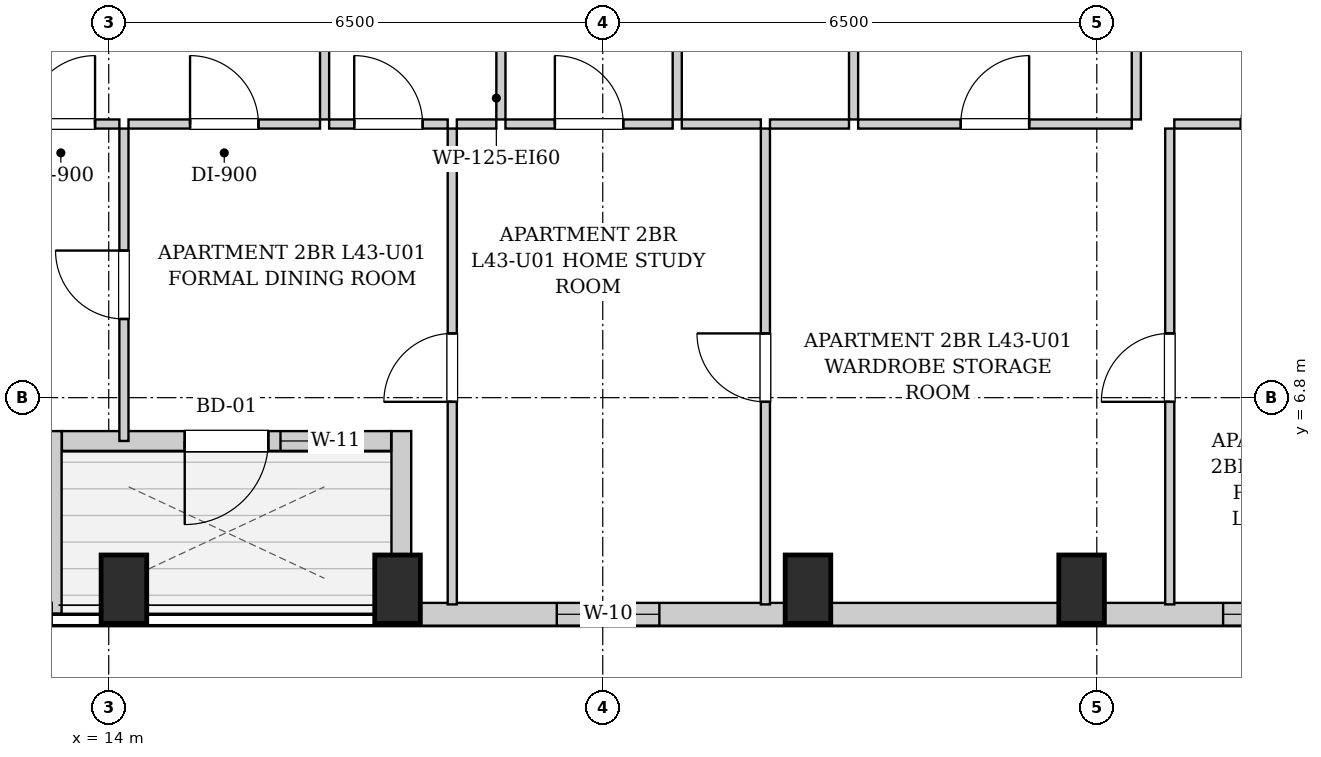
"""IFC4 building model, lengths in metres.
Left out: names, types, materials, properties, quantities, classifications, styles, units other than length and angle.
Written with IfcOpenShell. Run it as: python <this file> out.ifc"""

import sys

from ifc_helpers import new_model, si_unit, direction, frame, frame_2d, origin, origin_2d, place, context, subcontext, project, spatial, rectangle, extrude, element, fill, save


model = new_model("IFC4")
c1 = context("Model", 3, precision=1e-05, world=origin(), true_north=direction((0.0, 1.0)))
c2 = subcontext(c1, "Body", "Model", "MODEL_VIEW")
j1 = project(units=[si_unit("LENGTHUNIT", "METRE"), si_unit("PLANEANGLEUNIT", "RADIAN")], contexts=[c1])
p1 = place(None, origin())
s1 = spatial("IfcSite", under=j1, at=p1, CompositionType="ELEMENT")
p2 = place(p1, origin())
s2 = spatial("IfcBuilding", under=s1, at=p2, CompositionType="ELEMENT")
p3 = place(p2, frame((0.0, 0.0, 150.4)))
s3 = spatial("IfcBuildingStorey", under=s2, at=p3, CompositionType="ELEMENT", Elevation=150.4)
for number, where, z_axis, x_axis in (
    (1, (14.2, 4.28, 0.0), (0.0, 0.0, 1.0), (1.0, 0.0, 0.0)),
    (2, (17.8, 4.28, 0.0), (0.0, 0.0, 1.0), (1.0, 0.0, 0.0)),
    (3, (23.2, 4.28, 0.0), (0.0, 0.0, 1.0), (1.0, 0.0, 0.0)),
    (4, (26.8, 4.28, 0.0), (0.0, 0.0, 1.0), (1.0, 0.0, 0.0)),
):
    element("IfcColumn", number, at=place(p3, frame(where, z_axis=z_axis, x_axis=x_axis)), inside=s3, PredefinedType="COLUMN", context=c2, shape_type="SweptSolid", body=[
        extrude(rectangle(XDim=0.6, YDim=0.9, at=origin_2d()), origin(), (0.0, 0.0, 1.0), 3.25),
    ])
p4 = place(p3, frame((37.8, 3.95, 0.0), z_axis=(0.0, 0.0, 1.0), x_axis=(-1.0, 0.0, 0.0)))
e5 = element("IfcWall", 5, at=p4, inside=s3, PredefinedType="SOLIDWALL", context=c2, shape_type="SweptSolid", body=[
    extrude(rectangle(XDim=19.95, YDim=0.3, at=frame_2d((9.975, 0.0))), origin(), (0.0, 0.0, 1.0), 2.99),
])
p5 = place(p4, frame((16.555, 0.0, 0.55)))
e6 = element("IfcOpeningElement", 6, at=p5, cuts=e5, PredefinedType="OPENING", context=c2, shape_type="SweptSolid", body=[
    extrude(rectangle(XDim=1.35, YDim=1.2, at=frame_2d((0.675, 0.6))), frame((0.0, 0.16, 0.0), z_axis=(0.0, -1.0, 0.0), x_axis=(1.0, 0.0, 0.0)), (0.0, 0.0, 1.0), 0.32),
])
p6 = place(p4, frame((7.788, 0.0, 0.55)))
e7 = element("IfcOpeningElement", 7, at=p6, cuts=e5, PredefinedType="OPENING", context=c2, shape_type="SweptSolid", body=[
    extrude(rectangle(XDim=1.35, YDim=1.2, at=frame_2d((0.675, 0.6))), frame((0.0, 0.16, 0.0), z_axis=(0.0, -1.0, 0.0), x_axis=(1.0, 0.0, 0.0)), (0.0, 0.0, 1.0), 0.32),
])
p7 = place(p4, frame((5.06, 0.0, 0.55)))
e8 = element("IfcOpeningElement", 8, at=p7, cuts=e5, PredefinedType="OPENING", context=c2, shape_type="SweptSolid", body=[
    extrude(rectangle(XDim=1.35, YDim=1.2, at=frame_2d((0.675, 0.6))), frame((0.0, 0.16, 0.0), z_axis=(0.0, -1.0, 0.0), x_axis=(1.0, 0.0, 0.0)), (0.0, 0.0, 1.0), 0.32),
])
p8 = place(p3, frame((17.85, 3.96, 0.0), z_axis=(0.0, 0.0, 1.0), x_axis=(0.0, 1.0, 0.0)))
e9 = element("IfcWall", 9, at=p8, inside=s3, PredefinedType="SOLIDWALL", context=c2, shape_type="SweptSolid", body=[
    extrude(rectangle(XDim=2.4, YDim=0.26, at=frame_2d((1.2, 0.0))), origin(), (0.0, 0.0, 1.0), 2.442),
])
p9 = place(p3, frame((17.716, 6.23, 0.0), z_axis=(0.0, 0.0, 1.0), x_axis=(-1.0, 0.0, 0.0)))
e10 = element("IfcWall", 10, at=p9, inside=s3, PredefinedType="SOLIDWALL", context=c2, shape_type="SweptSolid", body=[
    extrude(rectangle(XDim=4.332, YDim=0.26, at=frame_2d((2.166, 0.0))), origin(), (0.0, 0.0, 1.0), 2.99),
])
p10 = place(p9, frame((1.616, 0.0, 0.0)))
e11 = element("IfcOpeningElement", 11, at=p10, cuts=e10, PredefinedType="OPENING", context=c2, shape_type="SweptSolid", body=[
    extrude(rectangle(XDim=1.1, YDim=2.0, at=frame_2d((0.55, 1.0))), frame((0.0, 0.14, 0.0), z_axis=(0.0, -1.0, 0.0), x_axis=(1.0, 0.0, 0.0)), (0.0, 0.0, 1.0), 0.28),
])
p11 = place(p9, frame((0.606, 0.0, 0.55)))
e12 = element("IfcOpeningElement", 12, at=p11, cuts=e10, PredefinedType="OPENING", context=c2, shape_type="SweptSolid", body=[
    extrude(rectangle(XDim=0.85, YDim=1.2, at=frame_2d((0.425, 0.6))), frame((0.0, 0.14, 0.0), z_axis=(0.0, -1.0, 0.0), x_axis=(1.0, 0.0, 0.0)), (0.0, 0.0, 1.0), 0.28),
])
p12 = place(p3, frame((13.25, 6.36, 0.0), z_axis=(0.0, 0.0, 1.0), x_axis=(0.0, -1.0, 0.0)))
e13 = element("IfcWall", 13, at=p12, inside=s3, PredefinedType="SOLIDWALL", context=c2, shape_type="SweptSolid", body=[
    extrude(rectangle(XDim=2.4, YDim=0.26, at=frame_2d((1.2, 0.0))), origin(), (0.0, 0.0, 1.0), 2.99),
])
p13 = place(p3, frame((16.84, 10.46, 0.0), z_axis=(0.0, 0.0, 1.0), x_axis=(0.0, 1.0, 0.0)))
e14 = element("IfcWall", 14, at=p13, inside=s3, PredefinedType="PARTITIONING", context=c2, shape_type="SweptSolid", body=[
    extrude(rectangle(XDim=2.85, YDim=0.12, at=frame_2d((1.425, 0.0))), origin(), (0.0, 0.0, 1.0), 2.99),
])
p14 = place(p13, frame((0.975, 0.0, 0.0)))
e15 = element("IfcOpeningElement", 15, at=p14, cuts=e14, PredefinedType="OPENING", context=c2, shape_type="SweptSolid", body=[
    extrude(rectangle(XDim=0.9, YDim=2.05, at=frame_2d((0.45, 1.025))), frame((0.0, 0.07, 0.0), z_axis=(0.0, -1.0, 0.0), x_axis=(1.0, 0.0, 0.0)), (0.0, 0.0, 1.0), 0.14),
])
p15 = place(p3, frame((12.6, 10.4, 0.0), z_axis=(0.0, 0.0, 1.0), x_axis=(1.0, 0.0, 0.0)))
e16 = element("IfcWall", 16, at=p15, inside=s3, PredefinedType="PARTITIONING", context=c2, shape_type="SweptSolid", body=[
    extrude(rectangle(XDim=1.54, YDim=0.12, at=frame_2d((0.77, 0.0))), origin(), (0.0, 0.0, 1.0), 2.99),
])
p16 = place(p15, frame((0.32, 0.0, 0.0)))
e17 = element("IfcOpeningElement", 17, at=p16, cuts=e16, PredefinedType="OPENING", context=c2, shape_type="SweptSolid", body=[
    extrude(rectangle(XDim=0.9, YDim=2.05, at=frame_2d((0.45, 1.025))), frame((0.0, 0.07, 0.0), z_axis=(0.0, -1.0, 0.0), x_axis=(1.0, 0.0, 0.0)), (0.0, 0.0, 1.0), 0.14),
])
p17 = place(p3, frame((14.26, 10.4, 0.0), z_axis=(0.0, 0.0, 1.0), x_axis=(1.0, 0.0, 0.0)))
e18 = element("IfcWall", 18, at=p17, inside=s3, PredefinedType="PARTITIONING", context=c2, shape_type="SweptSolid", body=[
    extrude(rectangle(XDim=2.52, YDim=0.12, at=frame_2d((1.26, 0.0))), origin(), (0.0, 0.0, 1.0), 2.99),
])
p18 = place(p17, frame((0.81, 0.0, 0.0)))
e19 = element("IfcOpeningElement", 19, at=p18, cuts=e18, PredefinedType="OPENING", context=c2, shape_type="SweptSolid", body=[
    extrude(rectangle(XDim=0.9, YDim=2.05, at=frame_2d((0.45, 1.025))), frame((0.0, 0.07, 0.0), z_axis=(0.0, -1.0, 0.0), x_axis=(1.0, 0.0, 0.0)), (0.0, 0.0, 1.0), 0.14),
])
p19 = place(p3, frame((19.16, 10.46, 0.0), z_axis=(0.0, 0.0, 1.0), x_axis=(0.0, 1.0, 0.0)))
e20 = element("IfcWall", 20, at=p19, inside=s3, PredefinedType="PARTITIONING", context=c2, shape_type="SweptSolid", body=[
    extrude(rectangle(XDim=2.85, YDim=0.12, at=frame_2d((1.425, 0.0))), origin(), (0.0, 0.0, 1.0), 2.99),
])
p20 = place(p19, frame((0.975, 0.0, 0.0)))
e21 = element("IfcOpeningElement", 21, at=p20, cuts=e20, PredefinedType="OPENING", context=c2, shape_type="SweptSolid", body=[
    extrude(rectangle(XDim=0.9, YDim=2.05, at=frame_2d((0.45, 1.025))), frame((0.0, 0.07, 0.0), z_axis=(0.0, -1.0, 0.0), x_axis=(1.0, 0.0, 0.0)), (0.0, 0.0, 1.0), 0.14),
])
p21 = place(p3, frame((16.9, 10.4, 0.0), z_axis=(0.0, 0.0, 1.0), x_axis=(1.0, 0.0, 0.0)))
e22 = element("IfcWall", 22, at=p21, inside=s3, PredefinedType="PARTITIONING", context=c2, shape_type="SweptSolid", body=[
    extrude(rectangle(XDim=1.56, YDim=0.12, at=frame_2d((0.78, 0.0))), origin(), (0.0, 0.0, 1.0), 2.99),
])
p22 = place(p21, frame((0.33, 0.0, 0.0)))
e23 = element("IfcOpeningElement", 23, at=p22, cuts=e22, PredefinedType="OPENING", context=c2, shape_type="SweptSolid", body=[
    extrude(rectangle(XDim=0.9, YDim=2.05, at=frame_2d((0.45, 1.025))), frame((0.0, 0.07, 0.0), z_axis=(0.0, -1.0, 0.0), x_axis=(1.0, 0.0, 0.0)), (0.0, 0.0, 1.0), 0.14),
])
p23 = place(p3, frame((18.58, 10.4, 0.0), z_axis=(0.0, 0.0, 1.0), x_axis=(1.0, 0.0, 0.0)))
e24 = element("IfcWall", 24, at=p23, inside=s3, PredefinedType="PARTITIONING", context=c2, shape_type="SweptSolid", body=[
    extrude(rectangle(XDim=0.52, YDim=0.12, at=frame_2d((0.26, 0.0))), origin(), (0.0, 0.0, 1.0), 2.99),
])
p24 = place(p3, frame((21.48, 10.46, 0.0), z_axis=(0.0, 0.0, 1.0), x_axis=(0.0, 1.0, 0.0)))
e25 = element("IfcWall", 25, at=p24, inside=s3, PredefinedType="PARTITIONING", context=c2, shape_type="SweptSolid", body=[
    extrude(rectangle(XDim=2.85, YDim=0.12, at=frame_2d((1.425, 0.0))), origin(), (0.0, 0.0, 1.0), 2.99),
])
p25 = place(p24, frame((0.975, 0.0, 0.0)))
e26 = element("IfcOpeningElement", 26, at=p25, cuts=e25, PredefinedType="OPENING", context=c2, shape_type="SweptSolid", body=[
    extrude(rectangle(XDim=0.9, YDim=2.05, at=frame_2d((0.45, 1.025))), frame((0.0, 0.07, 0.0), z_axis=(0.0, -1.0, 0.0), x_axis=(1.0, 0.0, 0.0)), (0.0, 0.0, 1.0), 0.14),
])
p26 = place(p3, frame((19.22, 10.4, 0.0), z_axis=(0.0, 0.0, 1.0), x_axis=(1.0, 0.0, 0.0)))
e27 = element("IfcWall", 27, at=p26, inside=s3, PredefinedType="PARTITIONING", context=c2, shape_type="SweptSolid", body=[
    extrude(rectangle(XDim=2.2, YDim=0.12, at=frame_2d((1.1, 0.0))), origin(), (0.0, 0.0, 1.0), 2.99),
])
p27 = place(p26, frame((0.65, 0.0, 0.0)))
e28 = element("IfcOpeningElement", 28, at=p27, cuts=e27, PredefinedType="OPENING", context=c2, shape_type="SweptSolid", body=[
    extrude(rectangle(XDim=0.9, YDim=2.05, at=frame_2d((0.45, 1.025))), frame((0.0, 0.07, 0.0), z_axis=(0.0, -1.0, 0.0), x_axis=(1.0, 0.0, 0.0)), (0.0, 0.0, 1.0), 0.14),
])
p28 = place(p3, frame((23.8, 10.46, 0.0), z_axis=(0.0, 0.0, 1.0), x_axis=(0.0, 1.0, 0.0)))
e29 = element("IfcWall", 29, at=p28, inside=s3, PredefinedType="PARTITIONING", context=c2, shape_type="SweptSolid", body=[
    extrude(rectangle(XDim=2.85, YDim=0.12, at=frame_2d((1.425, 0.0))), origin(), (0.0, 0.0, 1.0), 2.99),
])
p29 = place(p28, frame((0.975, 0.0, 0.0)))
e30 = element("IfcOpeningElement", 30, at=p29, cuts=e29, PredefinedType="OPENING", context=c2, shape_type="SweptSolid", body=[
    extrude(rectangle(XDim=0.9, YDim=2.05, at=frame_2d((0.45, 1.025))), frame((0.0, 0.07, 0.0), z_axis=(0.0, -1.0, 0.0), x_axis=(1.0, 0.0, 0.0)), (0.0, 0.0, 1.0), 0.14),
])
for number, where, z_axis, x_axis in (
    (31, (21.54, 10.4, 0.0), (0.0, 0.0, 1.0), (1.0, 0.0, 0.0)),
    (32, (22.7, 10.4, 0.0), (0.0, 0.0, 1.0), (1.0, 0.0, 0.0)),
):
    element("IfcWall", number, at=place(p3, frame(where, z_axis=z_axis, x_axis=x_axis)), inside=s3, PredefinedType="PARTITIONING", context=c2, shape_type="SweptSolid", body=[
        extrude(rectangle(XDim=1.04, YDim=0.12, at=frame_2d((0.52, 0.0))), origin(), (0.0, 0.0, 1.0), 2.99),
    ])
p30 = place(p3, frame((27.52, 10.46, 0.0), z_axis=(0.0, 0.0, 1.0), x_axis=(0.0, 1.0, 0.0)))
e33 = element("IfcWall", 33, at=p30, inside=s3, PredefinedType="PARTITIONING", context=c2, shape_type="SweptSolid", body=[
    extrude(rectangle(XDim=2.85, YDim=0.12, at=frame_2d((1.425, 0.0))), origin(), (0.0, 0.0, 1.0), 2.99),
])
p31 = place(p30, frame((0.975, 0.0, 0.0)))
e34 = element("IfcOpeningElement", 34, at=p31, cuts=e33, PredefinedType="OPENING", context=c2, shape_type="SweptSolid", body=[
    extrude(rectangle(XDim=0.9, YDim=2.05, at=frame_2d((0.45, 1.025))), frame((0.0, 0.07, 0.0), z_axis=(0.0, -1.0, 0.0), x_axis=(1.0, 0.0, 0.0)), (0.0, 0.0, 1.0), 0.14),
])
p32 = place(p3, frame((23.86, 10.4, 0.0), z_axis=(0.0, 0.0, 1.0), x_axis=(1.0, 0.0, 0.0)))
e35 = element("IfcWall", 35, at=p32, inside=s3, PredefinedType="PARTITIONING", context=c2, shape_type="SweptSolid", body=[
    extrude(rectangle(XDim=3.6, YDim=0.12, at=frame_2d((1.8, 0.0))), origin(), (0.0, 0.0, 1.0), 2.99),
])
p33 = place(p32, frame((1.35, 0.0, 0.0)))
e36 = element("IfcOpeningElement", 36, at=p33, cuts=e35, PredefinedType="OPENING", context=c2, shape_type="SweptSolid", body=[
    extrude(rectangle(XDim=0.9, YDim=2.05, at=frame_2d((0.45, 1.025))), frame((0.0, 0.07, 0.0), z_axis=(0.0, -1.0, 0.0), x_axis=(1.0, 0.0, 0.0)), (0.0, 0.0, 1.0), 0.14),
])
p34 = place(p3, frame((28.02, 10.4, 0.0), z_axis=(0.0, 0.0, 1.0), x_axis=(1.0, 0.0, 0.0)))
e37 = element("IfcWall", 37, at=p34, inside=s3, PredefinedType="PARTITIONING", context=c2, shape_type="SweptSolid", body=[
    extrude(rectangle(XDim=2.65, YDim=0.12, at=frame_2d((1.325, 0.0))), origin(), (0.0, 0.0, 1.0), 2.99),
])
p35 = place(p34, frame((0.875, 0.0, 0.0)))
e38 = element("IfcOpeningElement", 38, at=p35, cuts=e37, PredefinedType="OPENING", context=c2, shape_type="SweptSolid", body=[
    extrude(rectangle(XDim=0.9, YDim=2.05, at=frame_2d((0.45, 1.025))), frame((0.0, 0.07, 0.0), z_axis=(0.0, -1.0, 0.0), x_axis=(1.0, 0.0, 0.0)), (0.0, 0.0, 1.0), 0.14),
])
p36 = place(p3, frame((14.2, 6.23, 0.0), z_axis=(0.0, 0.0, 1.0), x_axis=(0.0, 1.0, 0.0)))
e39 = element("IfcWall", 39, at=p36, inside=s3, PredefinedType="PARTITIONING", context=c2, shape_type="SweptSolid", body=[
    extrude(rectangle(XDim=4.11, YDim=0.12, at=frame_2d((2.055, 0.0))), origin(), (0.0, 0.0, 1.0), 2.99),
])
p37 = place(p36, frame((1.605, 0.0, 0.0)))
e40 = element("IfcOpeningElement", 40, at=p37, cuts=e39, PredefinedType="OPENING", context=c2, shape_type="SweptSolid", body=[
    extrude(rectangle(XDim=0.9, YDim=2.05, at=frame_2d((0.45, 1.025))), frame((0.0, 0.07, 0.0), z_axis=(0.0, -1.0, 0.0), x_axis=(1.0, 0.0, 0.0)), (0.0, 0.0, 1.0), 0.14),
])
p38 = place(p3, frame((18.52, 4.08, 0.0), z_axis=(0.0, 0.0, 1.0), x_axis=(0.0, 1.0, 0.0)))
e41 = element("IfcWall", 41, at=p38, inside=s3, PredefinedType="PARTITIONING", context=c2, shape_type="SweptSolid", body=[
    extrude(rectangle(XDim=6.26, YDim=0.12, at=frame_2d((3.13, 0.0))), origin(), (0.0, 0.0, 1.0), 2.99),
])
p39 = place(p38, frame((2.665, 0.0, 0.0)))
e42 = element("IfcOpeningElement", 42, at=p39, cuts=e41, PredefinedType="OPENING", context=c2, shape_type="SweptSolid", body=[
    extrude(rectangle(XDim=0.9, YDim=2.05, at=frame_2d((0.45, 1.025))), frame((0.0, 0.07, 0.0), z_axis=(0.0, -1.0, 0.0), x_axis=(1.0, 0.0, 0.0)), (0.0, 0.0, 1.0), 0.14),
])
p40 = place(p3, frame((22.64, 4.08, 0.0), z_axis=(0.0, 0.0, 1.0), x_axis=(0.0, 1.0, 0.0)))
e43 = element("IfcWall", 43, at=p40, inside=s3, PredefinedType="PARTITIONING", context=c2, shape_type="SweptSolid", body=[
    extrude(rectangle(XDim=6.26, YDim=0.12, at=frame_2d((3.13, 0.0))), origin(), (0.0, 0.0, 1.0), 2.99),
])
p41 = place(p40, frame((2.665, 0.0, 0.0)))
e44 = element("IfcOpeningElement", 44, at=p41, cuts=e43, PredefinedType="OPENING", context=c2, shape_type="SweptSolid", body=[
    extrude(rectangle(XDim=0.9, YDim=2.05, at=frame_2d((0.45, 1.025))), frame((0.0, 0.07, 0.0), z_axis=(0.0, -1.0, 0.0), x_axis=(1.0, 0.0, 0.0)), (0.0, 0.0, 1.0), 0.14),
])
p42 = place(p3, frame((27.96, 4.08, 0.0), z_axis=(0.0, 0.0, 1.0), x_axis=(0.0, 1.0, 0.0)))
e45 = element("IfcWall", 45, at=p42, inside=s3, PredefinedType="PARTITIONING", context=c2, shape_type="SweptSolid", body=[
    extrude(rectangle(XDim=6.26, YDim=0.12, at=frame_2d((3.13, 0.0))), origin(), (0.0, 0.0, 1.0), 2.99),
])
p43 = place(p42, frame((2.665, 0.0, 0.0)))
e46 = element("IfcOpeningElement", 46, at=p43, cuts=e45, PredefinedType="OPENING", context=c2, shape_type="SweptSolid", body=[
    extrude(rectangle(XDim=0.9, YDim=2.05, at=frame_2d((0.45, 1.025))), frame((0.0, 0.07, 0.0), z_axis=(0.0, -1.0, 0.0), x_axis=(1.0, 0.0, 0.0)), (0.0, 0.0, 1.0), 0.14),
])
p44 = place(p16, origin())
e47 = element("IfcDoor", 47, at=p44, inside=s3, OperationType="SINGLE_SWING_RIGHT", PredefinedType="DOOR", context=c2, shape_type="SweptSolid", body=[
    extrude(rectangle(XDim=0.9, YDim=2.05, at=frame_2d((0.45, 1.025))), frame((0.0, 0.025, 0.0), z_axis=(0.0, -1.0, 0.0), x_axis=(1.0, 0.0, 0.0)), (0.0, 0.0, 1.0), 0.05),
])
fill(e17, e47)
p45 = place(p18, origin())
e48 = element("IfcDoor", 48, at=p45, inside=s3, OperationType="SINGLE_SWING_LEFT", PredefinedType="DOOR", context=c2, shape_type="SweptSolid", body=[
    extrude(rectangle(XDim=0.9, YDim=2.05, at=frame_2d((0.45, 1.025))), frame((0.0, 0.025, 0.0), z_axis=(0.0, -1.0, 0.0), x_axis=(1.0, 0.0, 0.0)), (0.0, 0.0, 1.0), 0.05),
])
fill(e19, e48)
p46 = place(p22, origin())
e49 = element("IfcDoor", 49, at=p46, inside=s3, OperationType="SINGLE_SWING_LEFT", PredefinedType="DOOR", context=c2, shape_type="SweptSolid", body=[
    extrude(rectangle(XDim=0.9, YDim=2.05, at=frame_2d((0.45, 1.025))), frame((0.0, 0.025, 0.0), z_axis=(0.0, -1.0, 0.0), x_axis=(1.0, 0.0, 0.0)), (0.0, 0.0, 1.0), 0.05),
])
fill(e23, e49)
p47 = place(p27, origin())
e50 = element("IfcDoor", 50, at=p47, inside=s3, OperationType="SINGLE_SWING_LEFT", PredefinedType="DOOR", context=c2, shape_type="SweptSolid", body=[
    extrude(rectangle(XDim=0.9, YDim=2.05, at=frame_2d((0.45, 1.025))), frame((0.0, 0.025, 0.0), z_axis=(0.0, -1.0, 0.0), x_axis=(1.0, 0.0, 0.0)), (0.0, 0.0, 1.0), 0.05),
])
fill(e28, e50)
p48 = place(p33, origin())
e51 = element("IfcDoor", 51, at=p48, inside=s3, OperationType="SINGLE_SWING_RIGHT", PredefinedType="DOOR", context=c2, shape_type="SweptSolid", body=[
    extrude(rectangle(XDim=0.9, YDim=2.05, at=frame_2d((0.45, 1.025))), frame((0.0, 0.025, 0.0), z_axis=(0.0, -1.0, 0.0), x_axis=(1.0, 0.0, 0.0)), (0.0, 0.0, 1.0), 0.05),
])
fill(e36, e51)
p49 = place(p35, origin())
e52 = element("IfcDoor", 52, at=p49, inside=s3, OperationType="SINGLE_SWING_RIGHT", PredefinedType="DOOR", context=c2, shape_type="SweptSolid", body=[
    extrude(rectangle(XDim=0.9, YDim=2.05, at=frame_2d((0.45, 1.025))), frame((0.0, 0.025, 0.0), z_axis=(0.0, -1.0, 0.0), x_axis=(1.0, 0.0, 0.0)), (0.0, 0.0, 1.0), 0.05),
])
fill(e38, e52)
p50 = place(p37, origin())
e53 = element("IfcDoor", 53, at=p50, inside=s3, OperationType="SINGLE_SWING_RIGHT", PredefinedType="DOOR", context=c2, shape_type="SweptSolid", body=[
    extrude(rectangle(XDim=0.9, YDim=2.05, at=frame_2d((0.45, 1.025))), frame((0.0, 0.025, 0.0), z_axis=(0.0, -1.0, 0.0), x_axis=(1.0, 0.0, 0.0)), (0.0, 0.0, 1.0), 0.05),
])
fill(e40, e53)
p51 = place(p39, origin())
e54 = element("IfcDoor", 54, at=p51, inside=s3, OperationType="SINGLE_SWING_LEFT", PredefinedType="DOOR", context=c2, shape_type="SweptSolid", body=[
    extrude(rectangle(XDim=0.9, YDim=2.05, at=frame_2d((0.45, 1.025))), frame((0.0, 0.025, 0.0), z_axis=(0.0, -1.0, 0.0), x_axis=(1.0, 0.0, 0.0)), (0.0, 0.0, 1.0), 0.05),
])
fill(e42, e54)
p52 = place(p41, origin())
e55 = element("IfcDoor", 55, at=p52, inside=s3, OperationType="SINGLE_SWING_RIGHT", PredefinedType="DOOR", context=c2, shape_type="SweptSolid", body=[
    extrude(rectangle(XDim=0.9, YDim=2.05, at=frame_2d((0.45, 1.025))), frame((0.0, 0.025, 0.0), z_axis=(0.0, -1.0, 0.0), x_axis=(1.0, 0.0, 0.0)), (0.0, 0.0, 1.0), 0.05),
])
fill(e44, e55)
p53 = place(p43, origin())
e56 = element("IfcDoor", 56, at=p53, inside=s3, OperationType="SINGLE_SWING_LEFT", PredefinedType="DOOR", context=c2, shape_type="SweptSolid", body=[
    extrude(rectangle(XDim=0.9, YDim=2.05, at=frame_2d((0.45, 1.025))), frame((0.0, 0.025, 0.0), z_axis=(0.0, -1.0, 0.0), x_axis=(1.0, 0.0, 0.0)), (0.0, 0.0, 1.0), 0.05),
])
fill(e46, e56)
p54 = place(p10, origin())
e57 = element("IfcDoor", 57, at=p54, inside=s3, OperationType="SINGLE_SWING_RIGHT", PredefinedType="DOOR", context=c2, shape_type="SweptSolid", body=[
    extrude(rectangle(XDim=1.1, YDim=2.0, at=frame_2d((0.55, 1.0))), frame((0.0, 0.025, 0.0), z_axis=(0.0, -1.0, 0.0), x_axis=(1.0, 0.0, 0.0)), (0.0, 0.0, 1.0), 0.05),
])
fill(e11, e57)
p55 = place(p11, origin())
e58 = element("IfcWindow", 58, at=p55, inside=s3, PartitioningType="SINGLE_PANEL", PredefinedType="WINDOW", context=c2, shape_type="SweptSolid", body=[
    extrude(rectangle(XDim=0.85, YDim=1.2, at=frame_2d((0.425, 0.6))), frame((0.0, 0.03, 0.0), z_axis=(0.0, -1.0, 0.0), x_axis=(1.0, 0.0, 0.0)), (0.0, 0.0, 1.0), 0.06),
])
fill(e12, e58)
p56 = place(p5, origin())
e59 = element("IfcWindow", 59, at=p56, inside=s3, PartitioningType="SINGLE_PANEL", PredefinedType="WINDOW", context=c2, shape_type="SweptSolid", body=[
    extrude(rectangle(XDim=1.35, YDim=1.2, at=frame_2d((0.675, 0.6))), frame((0.0, 0.03, 0.0), z_axis=(0.0, -1.0, 0.0), x_axis=(1.0, 0.0, 0.0)), (0.0, 0.0, 1.0), 0.06),
])
fill(e6, e59)
p57 = place(p6, origin())
e60 = element("IfcWindow", 60, at=p57, inside=s3, PartitioningType="SINGLE_PANEL", PredefinedType="WINDOW", context=c2, shape_type="SweptSolid", body=[
    extrude(rectangle(XDim=1.35, YDim=1.2, at=frame_2d((0.675, 0.6))), frame((0.0, 0.03, 0.0), z_axis=(0.0, -1.0, 0.0), x_axis=(1.0, 0.0, 0.0)), (0.0, 0.0, 1.0), 0.06),
])
fill(e7, e60)
save(model, sys.argv[1])
